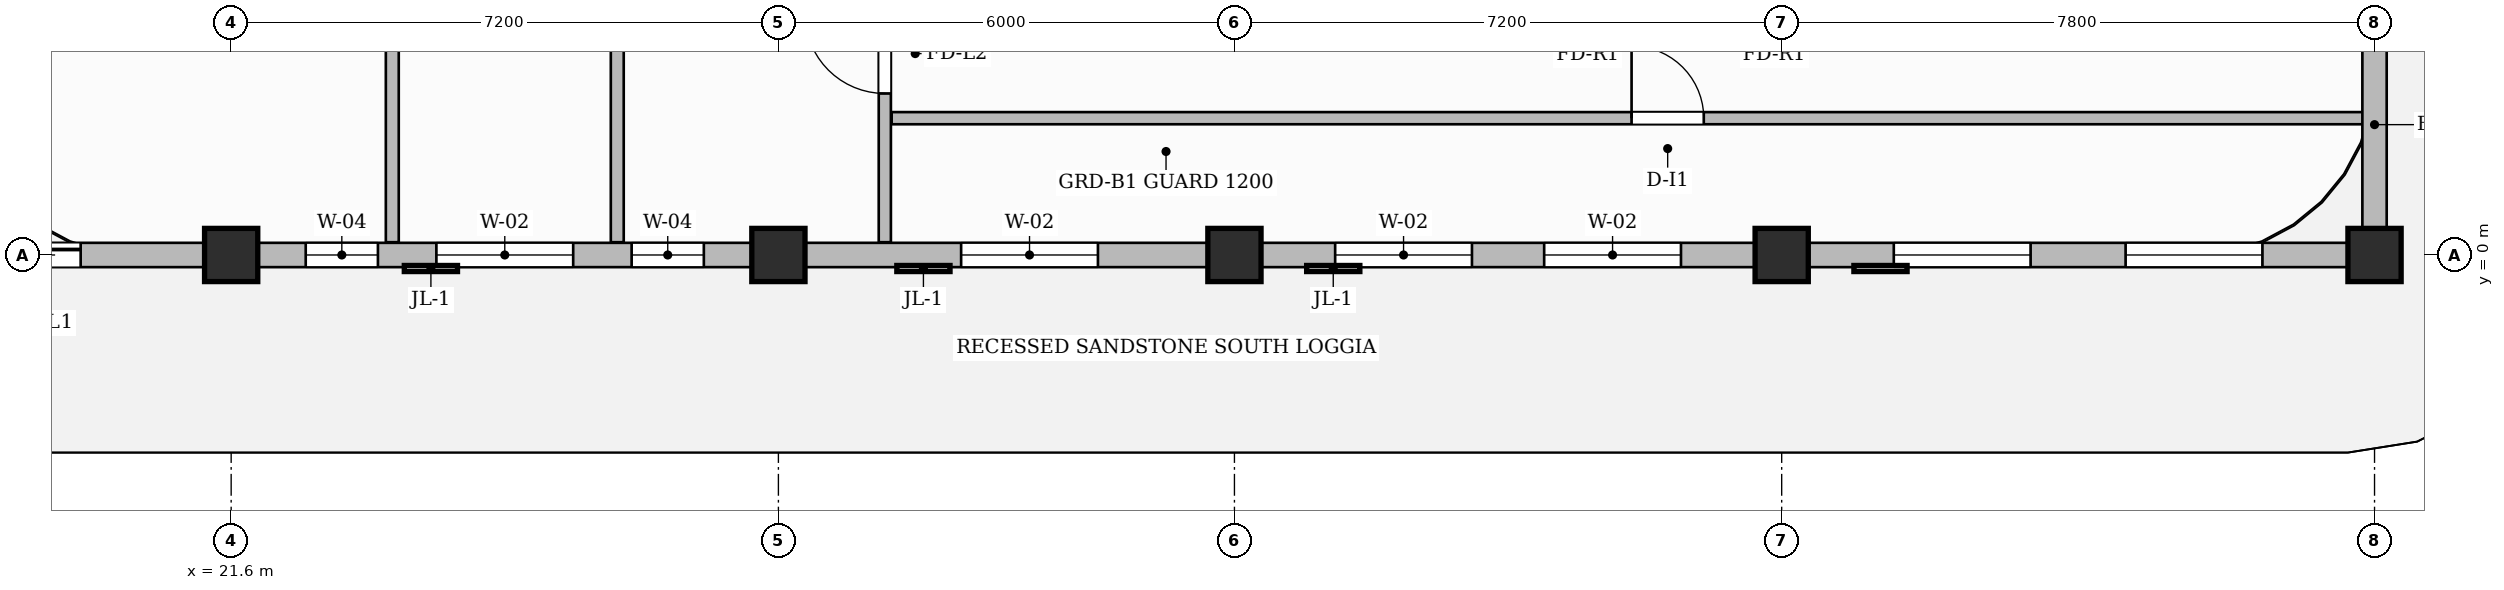
"""IFC4 building model, lengths in metres.
Left out: names, types, materials, properties, quantities, classifications, styles, units other than length and angle.
Written with IfcOpenShell. Run it as: python <this file> out.ifc"""

import sys

from ifc_helpers import new_model, si_unit, direction, frame, frame_2d, origin, origin_2d, place, context, subcontext, project, spatial, rectangle, extrude, source, transform, mapped, element, fill, save


model = new_model("IFC4")
c1 = context("Model", 3, precision=1e-05, world=origin(), true_north=direction((0.0, 1.0)))
c2 = subcontext(c1, "Body", "Model", "MODEL_VIEW")
j1 = project(units=[si_unit("LENGTHUNIT", "METRE"), si_unit("PLANEANGLEUNIT", "RADIAN")], contexts=[c1])
p1 = place(None, origin())
s1 = spatial("IfcSite", under=j1, at=p1, CompositionType="ELEMENT")
p2 = place(p1, origin())
s2 = spatial("IfcBuilding", under=s1, at=p2, CompositionType="ELEMENT")
p3 = place(p2, frame((0.0, 0.0, 278.9)))
s3 = spatial("IfcBuildingStorey", under=s2, at=p3, CompositionType="ELEMENT", Elevation=278.9)
m1 = source(origin(), c2, "Body", "SweptSolid", [
    extrude(rectangle(XDim=0.7, YDim=0.7, at=origin_2d()), origin(), (0.0, 0.0, 1.0), 3.85),
])
for number, where, z_axis, x_axis in (
    (1, (21.6, 0.0, 0.0), (0.0, 0.0, 1.0), (1.0, 0.0, 0.0)),
    (2, (28.8, 0.0, 0.0), (0.0, 0.0, 1.0), (1.0, 0.0, 0.0)),
    (3, (34.8, 0.0, 0.0), (0.0, 0.0, 1.0), (1.0, 0.0, 0.0)),
    (4, (42.0, 0.0, 0.0), (0.0, 0.0, 1.0), (1.0, 0.0, 0.0)),
    (5, (49.8, 0.0, 0.0), (0.0, 0.0, 1.0), (1.0, 0.0, 0.0)),
):
    element("IfcColumn", number, at=place(p3, frame(where, z_axis=z_axis, x_axis=x_axis)), inside=s3, PredefinedType="COLUMN", context=c2, shape_type="MappedRepresentation", body=[
        mapped(m1, transform((0.0, 0.0, 0.0), scale=1.0)),
    ])
p4 = place(p3, frame((30.2, 0.168, 0.0), z_axis=(0.0, 0.0, 1.0), x_axis=(0.0, 1.0, 0.0)))
e6 = element("IfcWall", 6, at=p4, inside=s3, PredefinedType="PARTITIONING", context=c2, shape_type="SweptSolid", body=[
    extrude(rectangle(XDim=9.692, YDim=0.16, at=frame_2d((4.846, 0.0))), origin(), (0.0, 0.0, 1.0), 3.6),
])
p5 = place(p4, frame((1.957, 0.0, 0.0)))
e7 = element("IfcOpeningElement", 7, at=p5, cuts=e6, PredefinedType="OPENING", context=c2, shape_type="SweptSolid", body=[
    extrude(rectangle(XDim=1.05, YDim=2.15, at=frame_2d((0.525, 1.075))), frame((0.0, 0.09, 0.0), z_axis=(0.0, -1.0, 0.0), x_axis=(1.0, 0.0, 0.0)), (0.0, 0.0, 1.0), 0.18),
])
p6 = place(p3, frame((30.29, 1.8, 0.0), z_axis=(0.0, 0.0, 1.0), x_axis=(1.0, 0.0, 0.0)))
e8 = element("IfcWall", 8, at=p6, inside=s3, PredefinedType="PARTITIONING", context=c2, shape_type="SweptSolid", body=[
    extrude(rectangle(XDim=19.37, YDim=0.16, at=frame_2d((9.685, 0.0))), origin(), (0.0, 0.0, 1.0), 3.6),
])
p7 = place(p6, frame((9.735, 0.0, 0.0)))
e9 = element("IfcOpeningElement", 9, at=p7, cuts=e8, PredefinedType="OPENING", context=c2, shape_type="SweptSolid", body=[
    extrude(rectangle(XDim=0.95, YDim=2.15, at=frame_2d((0.475, 1.075))), frame((0.0, 0.09, 0.0), z_axis=(0.0, -1.0, 0.0), x_axis=(1.0, 0.0, 0.0)), (0.0, 0.0, 1.0), 0.18),
])
for number, where, z_axis, x_axis in (
    (10, (23.72, 0.168, 0.0), (0.0, 0.0, 1.0), (0.0, 1.0, 0.0)),
    (11, (26.68, 0.168, 0.0), (0.0, 0.0, 1.0), (0.0, 1.0, 0.0)),
):
    element("IfcWall", number, at=place(p3, frame(where, z_axis=z_axis, x_axis=x_axis)), inside=s3, PredefinedType="PARTITIONING", context=c2, shape_type="SweptSolid", body=[
        extrude(rectangle(XDim=9.692, YDim=0.17, at=frame_2d((4.846, 0.0))), origin(), (0.0, 0.0, 1.0), 3.6),
    ])
p8 = place(p3, frame((18.0, 0.0, 0.0), z_axis=(0.0, 0.0, 1.0), x_axis=(1.0, 0.0, 0.0)))
e12 = element("IfcWall", 12, at=p8, inside=s3, PredefinedType="SOLIDWALL", context=c2, shape_type="SweptSolid", body=[
    extrude(rectangle(XDim=31.8, YDim=0.32, at=frame_2d((15.9, 0.0))), origin(), (0.0, 0.0, 1.0), 3.185),
])
p9 = place(p8, frame((0.42, 0.0, 0.0)))
e13 = element("IfcOpeningElement", 13, at=p9, cuts=e12, PredefinedType="OPENING", context=c2, shape_type="SweptSolid", body=[
    extrude(rectangle(XDim=1.2, YDim=2.2, at=frame_2d((0.6, 1.1))), frame((0.0, 0.17, 0.0), z_axis=(0.0, -1.0, 0.0), x_axis=(1.0, 0.0, 0.0)), (0.0, 0.0, 1.0), 0.34),
])
p10 = place(p8, frame((4.581, 0.0, 0.8)))
e14 = element("IfcOpeningElement", 14, at=p10, cuts=e12, PredefinedType="OPENING", context=c2, shape_type="SweptSolid", body=[
    extrude(rectangle(XDim=0.95, YDim=1.75, at=frame_2d((0.475, 0.875))), frame((0.0, 0.17, 0.0), z_axis=(0.0, -1.0, 0.0), x_axis=(1.0, 0.0, 0.0)), (0.0, 0.0, 1.0), 0.34),
])
p11 = place(p8, frame((6.3, 0.0, 0.8)))
e15 = element("IfcOpeningElement", 15, at=p11, cuts=e12, PredefinedType="OPENING", context=c2, shape_type="SweptSolid", body=[
    extrude(rectangle(XDim=1.8, YDim=1.85, at=frame_2d((0.9, 0.925))), frame((0.0, 0.17, 0.0), z_axis=(0.0, -1.0, 0.0), x_axis=(1.0, 0.0, 0.0)), (0.0, 0.0, 1.0), 0.34),
])
p12 = place(p8, frame((8.869, 0.0, 0.8)))
e16 = element("IfcOpeningElement", 16, at=p12, cuts=e12, PredefinedType="OPENING", context=c2, shape_type="SweptSolid", body=[
    extrude(rectangle(XDim=0.95, YDim=1.75, at=frame_2d((0.475, 0.875))), frame((0.0, 0.17, 0.0), z_axis=(0.0, -1.0, 0.0), x_axis=(1.0, 0.0, 0.0)), (0.0, 0.0, 1.0), 0.34),
])
p13 = place(p8, frame((13.204, 0.0, 0.8)))
e17 = element("IfcOpeningElement", 17, at=p13, cuts=e12, PredefinedType="OPENING", context=c2, shape_type="SweptSolid", body=[
    extrude(rectangle(XDim=1.8, YDim=1.85, at=frame_2d((0.9, 0.925))), frame((0.0, 0.17, 0.0), z_axis=(0.0, -1.0, 0.0), x_axis=(1.0, 0.0, 0.0)), (0.0, 0.0, 1.0), 0.34),
])
p14 = place(p8, frame((18.125, 0.0, 0.8)))
e18 = element("IfcOpeningElement", 18, at=p14, cuts=e12, PredefinedType="OPENING", context=c2, shape_type="SweptSolid", body=[
    extrude(rectangle(XDim=1.8, YDim=1.85, at=frame_2d((0.9, 0.925))), frame((0.0, 0.17, 0.0), z_axis=(0.0, -1.0, 0.0), x_axis=(1.0, 0.0, 0.0)), (0.0, 0.0, 1.0), 0.34),
])
p15 = place(p8, frame((20.875, 0.0, 0.8)))
e19 = element("IfcOpeningElement", 19, at=p15, cuts=e12, PredefinedType="OPENING", context=c2, shape_type="SweptSolid", body=[
    extrude(rectangle(XDim=1.8, YDim=1.85, at=frame_2d((0.9, 0.925))), frame((0.0, 0.17, 0.0), z_axis=(0.0, -1.0, 0.0), x_axis=(1.0, 0.0, 0.0)), (0.0, 0.0, 1.0), 0.34),
])
p16 = place(p8, frame((25.475, 0.0, 0.8)))
e20 = element("IfcOpeningElement", 20, at=p16, cuts=e12, PredefinedType="OPENING", context=c2, shape_type="SweptSolid", body=[
    extrude(rectangle(XDim=1.8, YDim=1.85, at=frame_2d((0.9, 0.925))), frame((0.0, 0.17, 0.0), z_axis=(0.0, -1.0, 0.0), x_axis=(1.0, 0.0, 0.0)), (0.0, 0.0, 1.0), 0.34),
])
p17 = place(p8, frame((28.525, 0.0, 0.8)))
e21 = element("IfcOpeningElement", 21, at=p17, cuts=e12, PredefinedType="OPENING", context=c2, shape_type="SweptSolid", body=[
    extrude(rectangle(XDim=1.8, YDim=1.85, at=frame_2d((0.9, 0.925))), frame((0.0, 0.17, 0.0), z_axis=(0.0, -1.0, 0.0), x_axis=(1.0, 0.0, 0.0)), (0.0, 0.0, 1.0), 0.34),
])
p18 = place(p3, frame((49.8, 0.05, 0.0), z_axis=(0.0, 0.0, 1.0), x_axis=(0.0, 1.0, 0.0)))
e22 = element("IfcWall", 22, at=p18, inside=s3, PredefinedType="SOLIDWALL", context=c2, shape_type="SweptSolid", body=[
    extrude(rectangle(XDim=3.33, YDim=0.32, at=frame_2d((1.665, 0.0))), origin(), (0.0, 0.0, 1.0), 3.6),
])
m2 = source(origin(), c2, "Body", "SweptSolid", [
    extrude(rectangle(XDim=1.05, YDim=2.15, at=frame_2d((0.525, 1.075))), frame((0.0, 0.025, 0.0), z_axis=(0.0, -1.0, 0.0), x_axis=(1.0, 0.0, 0.0)), (0.0, 0.0, 1.0), 0.05),
])
p19 = place(p5, origin())
e23 = element("IfcDoor", 23, at=p19, inside=s3, OperationType="SINGLE_SWING_RIGHT", PredefinedType="DOOR", context=c2, shape_type="MappedRepresentation", body=[
    mapped(m2, transform((0.0, 0.0, 0.0), scale=1.0)),
])
fill(e7, e23)
m3 = source(origin(), c2, "Body", "SweptSolid", [
    extrude(rectangle(XDim=0.95, YDim=2.15, at=frame_2d((0.475, 1.075))), frame((0.0, 0.025, 0.0), z_axis=(0.0, -1.0, 0.0), x_axis=(1.0, 0.0, 0.0)), (0.0, 0.0, 1.0), 0.05),
])
p20 = place(p7, origin())
e24 = element("IfcDoor", 24, at=p20, inside=s3, OperationType="SINGLE_SWING_LEFT", PredefinedType="DOOR", context=c2, shape_type="MappedRepresentation", body=[
    mapped(m3, transform((0.0, 0.0, 0.0), scale=1.0)),
])
fill(e9, e24)
m4 = source(origin(), c2, "Body", "SweptSolid", [
    extrude(rectangle(XDim=1.2, YDim=2.2, at=frame_2d((0.6, 1.1))), frame((0.0, 0.025, 0.0), z_axis=(0.0, -1.0, 0.0), x_axis=(1.0, 0.0, 0.0)), (0.0, 0.0, 1.0), 0.05),
])
p21 = place(p9, origin())
e25 = element("IfcDoor", 25, at=p21, inside=s3, OperationType="SLIDING_TO_LEFT", PredefinedType="DOOR", context=c2, shape_type="MappedRepresentation", body=[
    mapped(m4, transform((0.0, 0.0, 0.0), scale=1.0)),
])
fill(e13, e25)
m5 = source(origin(), c2, "Body", "SweptSolid", [
    extrude(rectangle(XDim=0.95, YDim=1.75, at=frame_2d((0.475, 0.875))), frame((0.0, 0.03, 0.0), z_axis=(0.0, -1.0, 0.0), x_axis=(1.0, 0.0, 0.0)), (0.0, 0.0, 1.0), 0.06),
])
p22 = place(p10, origin())
e26 = element("IfcWindow", 26, at=p22, inside=s3, PartitioningType="SINGLE_PANEL", PredefinedType="WINDOW", context=c2, shape_type="MappedRepresentation", body=[
    mapped(m5, transform((0.0, 0.0, 0.0), scale=1.0)),
])
fill(e14, e26)
m6 = source(origin(), c2, "Body", "SweptSolid", [
    extrude(rectangle(XDim=1.8, YDim=1.85, at=frame_2d((0.9, 0.925))), frame((0.0, 0.03, 0.0), z_axis=(0.0, -1.0, 0.0), x_axis=(1.0, 0.0, 0.0)), (0.0, 0.0, 1.0), 0.06),
])
p23 = place(p11, origin())
e27 = element("IfcWindow", 27, at=p23, inside=s3, PartitioningType="DOUBLE_PANEL_VERTICAL", PredefinedType="WINDOW", context=c2, shape_type="MappedRepresentation", body=[
    mapped(m6, transform((0.0, 0.0, 0.0), scale=1.0)),
])
fill(e15, e27)
p24 = place(p12, origin())
e28 = element("IfcWindow", 28, at=p24, inside=s3, PartitioningType="SINGLE_PANEL", PredefinedType="WINDOW", context=c2, shape_type="MappedRepresentation", body=[
    mapped(m5, transform((0.0, 0.0, 0.0), scale=1.0)),
])
fill(e16, e28)
p25 = place(p13, origin())
e29 = element("IfcWindow", 29, at=p25, inside=s3, PartitioningType="DOUBLE_PANEL_VERTICAL", PredefinedType="WINDOW", context=c2, shape_type="MappedRepresentation", body=[
    mapped(m6, transform((0.0, 0.0, 0.0), scale=1.0)),
])
fill(e17, e29)
p26 = place(p14, origin())
e30 = element("IfcWindow", 30, at=p26, inside=s3, PartitioningType="DOUBLE_PANEL_VERTICAL", PredefinedType="WINDOW", context=c2, shape_type="MappedRepresentation", body=[
    mapped(m6, transform((0.0, 0.0, 0.0), scale=1.0)),
])
fill(e18, e30)
p27 = place(p15, origin())
e31 = element("IfcWindow", 31, at=p27, inside=s3, PartitioningType="DOUBLE_PANEL_VERTICAL", PredefinedType="WINDOW", context=c2, shape_type="MappedRepresentation", body=[
    mapped(m6, transform((0.0, 0.0, 0.0), scale=1.0)),
])
fill(e19, e31)
p28 = place(p16, origin())
e32 = element("IfcWindow", 32, at=p28, inside=s3, PartitioningType="DOUBLE_PANEL_VERTICAL", PredefinedType="WINDOW", context=c2, shape_type="MappedRepresentation", body=[
    mapped(m6, transform((0.0, 0.0, 0.0), scale=1.0)),
])
fill(e20, e32)
p29 = place(p17, origin())
e33 = element("IfcWindow", 33, at=p29, inside=s3, PartitioningType="DOUBLE_PANEL_VERTICAL", PredefinedType="WINDOW", context=c2, shape_type="MappedRepresentation", body=[
    mapped(m6, transform((0.0, 0.0, 0.0), scale=1.0)),
])
fill(e21, e33)
save(model, sys.argv[1])
